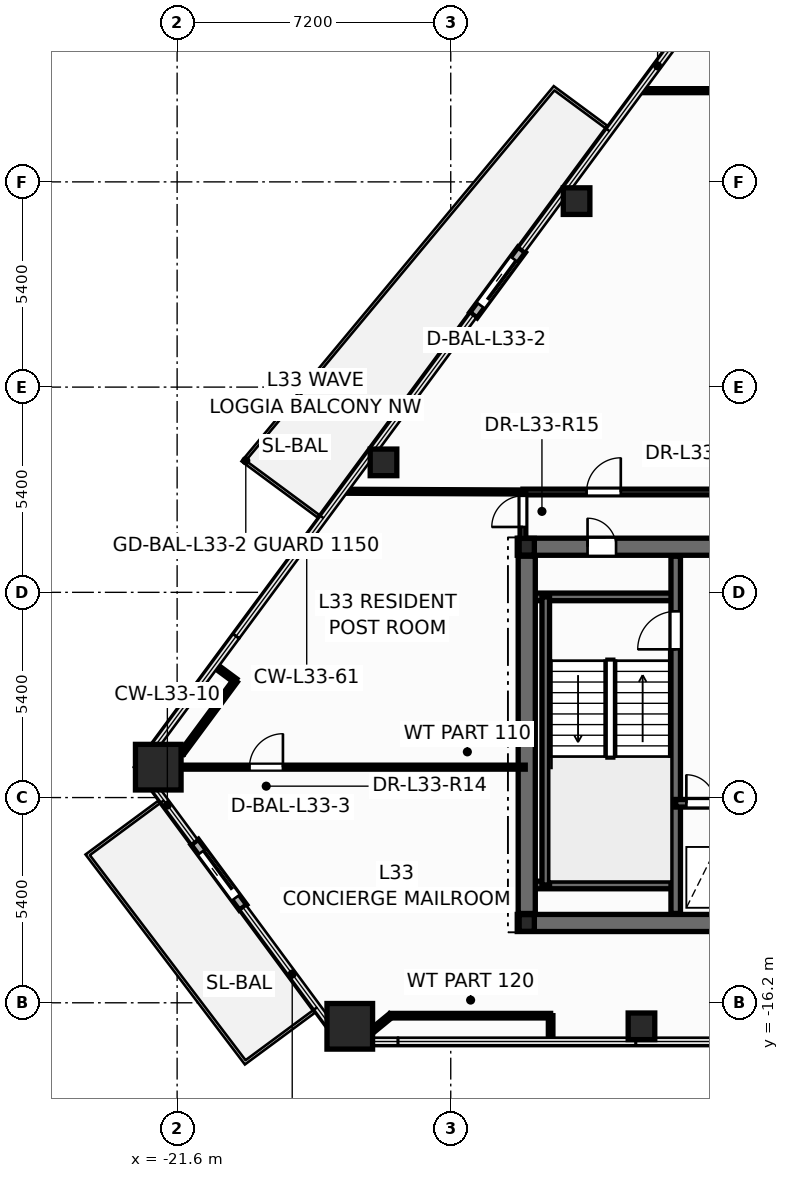
"""IFC4 building model, lengths in metres.
Left out: names, types, materials, properties, quantities, classifications, styles, units other than length and angle.
Written with IfcOpenShell. Run it as: python <this file> out.ifc"""

import sys

from ifc_helpers import new_model, si_unit, direction, frame, frame_2d, origin, origin_2d, place, context, subcontext, project, spatial, rectangle, hollow_rectangle, hollow_circle, i_section, extrude, element, fill, save


model = new_model("IFC4")
c1 = context("Model", 3, precision=1e-05, world=origin(), true_north=direction((0.0, 1.0)))
c2 = subcontext(c1, "Body", "Model", "MODEL_VIEW")
j1 = project(units=[si_unit("LENGTHUNIT", "METRE"), si_unit("PLANEANGLEUNIT", "RADIAN")], contexts=[c1])
p1 = place(None, origin())
s1 = spatial("IfcSite", under=j1, at=p1, CompositionType="ELEMENT")
p2 = place(p1, origin())
s2 = spatial("IfcBuilding", under=s1, at=p2, CompositionType="ELEMENT")
p3 = place(p2, frame((0.0, 0.0, 129.3)))
s3 = spatial("IfcBuildingStorey", under=s2, at=p3, CompositionType="ELEMENT", Elevation=129.3)
for number, where, z_axis, x_axis in (
    (1, (-22.096, -10.0, 0.0), (0.0, 0.0, 1.0), (1.0, 0.0, 0.0)),
    (2, (-17.057, -16.819, 0.0), (0.0, 0.0, 1.0), (1.0, 0.0, 0.0)),
):
    element("IfcColumn", number, at=place(p3, frame(where, z_axis=z_axis, x_axis=x_axis)), inside=s3, PredefinedType="COLUMN", context=c2, shape_type="SweptSolid", body=[
        extrude(hollow_rectangle(XDim=1.2, YDim=1.2, WallThickness=0.055, at=origin_2d()), origin(), (0.0, 0.0, 1.0), 3.6),
    ])
for number, where, z_axis, x_axis in (
    (3, (-9.381, -16.819, 0.0), (0.0, 0.0, 1.0), (1.0, 0.0, 0.0)),
    (4, (-11.089, 4.894, 0.0), (0.0, 0.0, 1.0), (1.0, 0.0, 0.0)),
    (5, (-16.169, -1.98, 0.0), (0.0, 0.0, 1.0), (1.0, 0.0, 0.0)),
):
    element("IfcColumn", number, at=place(p3, frame(where, z_axis=z_axis, x_axis=x_axis)), inside=s3, PredefinedType="COLUMN", context=c2, shape_type="SweptSolid", body=[
        extrude(hollow_circle(Radius=0.35, WallThickness=0.03, at=origin_2d()), origin(), (0.0, 0.0, 1.0), 3.6),
    ])
for number, where, z_axis, x_axis in (
    (6, (-12.4, -14.1, 0.0), (0.0, 0.0, 1.0), (1.0, 0.0, 0.0)),
    (7, (-12.4, -4.2, 0.0), (0.0, 0.0, 1.0), (1.0, 0.0, 0.0)),
):
    element("IfcColumn", number, at=place(p3, frame(where, z_axis=z_axis, x_axis=x_axis)), inside=s3, PredefinedType="COLUMN", context=c2, shape_type="SweptSolid", body=[
        extrude(i_section(OverallWidth=0.4, OverallDepth=0.44, WebThickness=0.028, FlangeThickness=0.04, at=origin_2d()), origin(), (0.0, 0.0, 1.0), 3.6),
    ])
p4 = place(p3, frame((-12.532, 3.614, -0.015), z_axis=(0.0, 0.0, 1.0), x_axis=(-0.594381437757, -0.804183254271, 0.0)))
e8 = element("IfcWall", 8, at=p4, inside=s3, PredefinedType="STANDARD", context=c2, shape_type="SweptSolid", body=[
    extrude(rectangle(XDim=2.14, YDim=0.24, at=frame_2d((1.07, 0.0))), origin(), (0.0, 0.0, 1.0), 2.807),
])
p5 = place(p4, frame((0.32, 0.0, 0.015)))
e9 = element("IfcOpeningElement", 9, at=p5, cuts=e8, PredefinedType="OPENING", context=c2, shape_type="SweptSolid", body=[
    extrude(rectangle(XDim=1.506, YDim=2.204, at=frame_2d((0.75, 1.102))), frame((0.0, 0.13, 0.0), z_axis=(0.0, -1.0, 0.0), x_axis=(1.0, 0.0, 0.0)), (0.0, 0.0, 1.0), 0.26),
])
p6 = place(p3, frame((-21.138, -11.97, -0.015), z_axis=(0.0, 0.0, 1.0), x_axis=(0.594381437757, -0.804183254271, 0.0)))
e10 = element("IfcWall", 10, at=p6, inside=s3, PredefinedType="STANDARD", context=c2, shape_type="SweptSolid", body=[
    extrude(rectangle(XDim=2.14, YDim=0.24, at=frame_2d((1.07, 0.0))), origin(), (0.0, 0.0, 1.0), 2.807),
])
p7 = place(p6, frame((0.32, 0.0, 0.015)))
e11 = element("IfcOpeningElement", 11, at=p7, cuts=e10, PredefinedType="OPENING", context=c2, shape_type="SweptSolid", body=[
    extrude(rectangle(XDim=1.506, YDim=2.204, at=frame_2d((0.75, 1.102))), frame((0.0, 0.13, 0.0), z_axis=(0.0, -1.0, 0.0), x_axis=(1.0, 0.0, 0.0)), (0.0, 0.0, 1.0), 0.26),
])
p8 = place(p3, frame((-12.65, -14.1, 0.0), z_axis=(0.0, 0.0, 1.0), x_axis=(1.0, 0.0, 0.0)))
e12 = element("IfcWall", 12, at=p8, inside=s3, PredefinedType="SHEAR", context=c2, shape_type="SweptSolid", body=[
    extrude(rectangle(XDim=25.3, YDim=0.45, at=frame_2d((12.65, 0.0))), origin(), (0.0, 0.0, 1.0), 3.6),
])
p9 = place(p3, frame((-12.65, -4.2, 0.0), z_axis=(0.0, 0.0, 1.0), x_axis=(1.0, 0.0, 0.0)))
e13 = element("IfcWall", 13, at=p9, inside=s3, PredefinedType="SHEAR", context=c2, shape_type="SweptSolid", body=[
    extrude(rectangle(XDim=25.3, YDim=0.45, at=frame_2d((12.65, 0.0))), origin(), (0.0, 0.0, 1.0), 3.6),
])
p10 = place(p9, frame((1.85, 0.0, 0.0)))
e14 = element("IfcOpeningElement", 14, at=p10, cuts=e13, PredefinedType="OPENING", context=c2, shape_type="SweptSolid", body=[
    extrude(rectangle(XDim=0.756, YDim=2.054, at=frame_2d((0.375, 1.027))), frame((0.0, 0.235, 0.0), z_axis=(0.0, -1.0, 0.0), x_axis=(1.0, 0.0, 0.0)), (0.0, 0.0, 1.0), 0.47),
])
p11 = place(p9, frame((22.65, 0.0, 0.0)))
e15 = element("IfcOpeningElement", 15, at=p11, cuts=e13, PredefinedType="OPENING", context=c2, shape_type="SweptSolid", body=[
    extrude(rectangle(XDim=0.756, YDim=2.054, at=frame_2d((0.375, 1.027))), frame((0.0, 0.235, 0.0), z_axis=(0.0, -1.0, 0.0), x_axis=(1.0, 0.0, 0.0)), (0.0, 0.0, 1.0), 0.47),
])
p12 = place(p9, frame((5.85, 0.0, 0.0)))
e16 = element("IfcOpeningElement", 16, at=p12, cuts=e13, PredefinedType="OPENING", context=c2, shape_type="SweptSolid", body=[
    extrude(rectangle(XDim=1.006, YDim=2.104, at=frame_2d((0.5, 1.052))), frame((0.0, 0.235, 0.0), z_axis=(0.0, -1.0, 0.0), x_axis=(1.0, 0.0, 0.0)), (0.0, 0.0, 1.0), 0.47),
])
p13 = place(p9, frame((10.35, 0.0, 0.0)))
e17 = element("IfcOpeningElement", 17, at=p13, cuts=e13, PredefinedType="OPENING", context=c2, shape_type="SweptSolid", body=[
    extrude(rectangle(XDim=1.406, YDim=2.154, at=frame_2d((0.7, 1.077))), frame((0.0, 0.235, 0.0), z_axis=(0.0, -1.0, 0.0), x_axis=(1.0, 0.0, 0.0)), (0.0, 0.0, 1.0), 0.47),
])
p14 = place(p9, frame((18.45, 0.0, 0.0)))
e18 = element("IfcOpeningElement", 18, at=p14, cuts=e13, PredefinedType="OPENING", context=c2, shape_type="SweptSolid", body=[
    extrude(rectangle(XDim=1.006, YDim=2.104, at=frame_2d((0.5, 1.052))), frame((0.0, 0.235, 0.0), z_axis=(0.0, -1.0, 0.0), x_axis=(1.0, 0.0, 0.0)), (0.0, 0.0, 1.0), 0.47),
])
for number, where, z_axis, x_axis in (
    (19, (-12.35, -5.52, 0.0), (0.0, 0.0, 1.0), (1.0, 0.0, 0.0)),
    (20, (-12.35, -13.1, 0.0), (0.0, 0.0, 1.0), (1.0, 0.0, 0.0)),
):
    element("IfcWall", number, at=place(p3, frame(where, z_axis=z_axis, x_axis=x_axis)), inside=s3, PredefinedType="SOLIDWALL", context=c2, shape_type="SweptSolid", body=[
        extrude(rectangle(XDim=3.87, YDim=0.2, at=frame_2d((1.935, 0.0))), origin(), (0.0, 0.0, 1.0), 3.6),
    ])
p15 = place(p3, frame((-11.9, -13.1, 0.0), z_axis=(0.0, 0.0, 1.0), x_axis=(0.0, 1.0, 0.0)))
e21 = element("IfcWall", 21, at=p15, inside=s3, PredefinedType="SOLIDWALL", context=c2, shape_type="SweptSolid", body=[
    extrude(rectangle(XDim=7.58, YDim=0.2, at=frame_2d((3.79, 0.0))), origin(), (0.0, 0.0, 1.0), 3.6),
])
p16 = place(p3, frame((-8.48, -13.85, 0.0), z_axis=(0.0, 0.0, 1.0), x_axis=(0.0, 1.0, 0.0)))
e22 = element("IfcWall", 22, at=p16, inside=s3, PredefinedType="SHEAR", context=c2, shape_type="SweptSolid", body=[
    extrude(rectangle(XDim=9.4, YDim=0.25, at=frame_2d((4.7, 0.0))), origin(), (0.0, 0.0, 1.0), 3.6),
])
p17 = place(p16, frame((6.95, 0.0, 0.0)))
e23 = element("IfcOpeningElement", 23, at=p17, cuts=e22, PredefinedType="OPENING", context=c2, shape_type="SweptSolid", body=[
    extrude(rectangle(XDim=1.006, YDim=2.104, at=frame_2d((0.5, 1.052))), frame((0.0, 0.135, 0.0), z_axis=(0.0, -1.0, 0.0), x_axis=(1.0, 0.0, 0.0)), (0.0, 0.0, 1.0), 0.27),
])
p18 = place(p3, frame((-8.48, -10.95, 0.0), z_axis=(0.0, 0.0, 1.0), x_axis=(1.0, 0.0, 0.0)))
e24 = element("IfcWall", 24, at=p18, inside=s3, PredefinedType="SOLIDWALL", context=c2, shape_type="SweptSolid", body=[
    extrude(rectangle(XDim=3.36, YDim=0.2, at=frame_2d((1.68, 0.0))), origin(), (0.0, 0.0, 1.0), 3.6),
])
p19 = place(p18, frame((0.28, 0.0, 0.0)))
e25 = element("IfcOpeningElement", 25, at=p19, cuts=e24, PredefinedType="OPENING", context=c2, shape_type="SweptSolid", body=[
    extrude(rectangle(XDim=0.756, YDim=2.054, at=frame_2d((0.375, 1.027))), frame((0.0, 0.11, 0.0), z_axis=(0.0, -1.0, 0.0), x_axis=(1.0, 0.0, 0.0)), (0.0, 0.0, 1.0), 0.22),
])
p20 = place(p18, frame((1.85, 0.0, 0.0)))
e26 = element("IfcOpeningElement", 26, at=p20, cuts=e24, PredefinedType="OPENING", context=c2, shape_type="SweptSolid", body=[
    extrude(rectangle(XDim=1.106, YDim=2.104, at=frame_2d((0.55, 1.052))), frame((0.0, 0.11, 0.0), z_axis=(0.0, -1.0, 0.0), x_axis=(1.0, 0.0, 0.0)), (0.0, 0.0, 1.0), 0.22),
])
p21 = place(p3, frame((-12.4, -13.85, 0.0), z_axis=(0.0, 0.0, 1.0), x_axis=(0.0, 1.0, 0.0)))
e27 = element("IfcWall", 27, at=p21, inside=s3, PredefinedType="SHEAR", context=c2, shape_type="SweptSolid", body=[
    extrude(rectangle(XDim=9.4, YDim=0.45, at=frame_2d((4.7, 0.0))), origin(), (0.0, 0.0, 1.0), 3.6),
])
p22 = place(p3, frame((-12.5, -2.76, 0.0), z_axis=(0.0, 0.0, 1.0), x_axis=(1.0, 0.0, 0.0)))
e28 = element("IfcWall", 28, at=p22, inside=s3, PredefinedType="PARTITIONING", context=c2, shape_type="SweptSolid", body=[
    extrude(rectangle(XDim=13.14, YDim=0.15, at=frame_2d((6.57, 0.0))), origin(), (0.0, 0.0, 1.0), 2.325),
])
p23 = place(p22, frame((1.675, 0.0, 0.0)))
e29 = element("IfcOpeningElement", 29, at=p23, cuts=e28, PredefinedType="OPENING", context=c2, shape_type="SweptSolid", body=[
    extrude(rectangle(XDim=0.906, YDim=2.104, at=frame_2d((0.45, 1.052))), frame((0.0, 0.085, 0.0), z_axis=(0.0, -1.0, 0.0), x_axis=(1.0, 0.0, 0.0)), (0.0, 0.0, 1.0), 0.17),
])
p24 = place(p3, frame((-22.594, -10.0, 0.0), z_axis=(0.0, 0.0, 1.0), x_axis=(1.0, 0.0, 0.0)))
e30 = element("IfcWall", 30, at=p24, inside=s3, PredefinedType="PARTITIONING", context=c2, shape_type="SweptSolid", body=[
    extrude(rectangle(XDim=10.154, YDim=0.105, at=frame_2d((5.077, 0.0))), origin(), (0.0, 0.0, 1.0), 2.325),
])
p25 = place(p24, frame((2.898, 0.0, 0.0)))
e31 = element("IfcOpeningElement", 31, at=p25, cuts=e30, PredefinedType="OPENING", context=c2, shape_type="SweptSolid", body=[
    extrude(rectangle(XDim=0.886, YDim=2.104, at=frame_2d((0.44, 1.052))), frame((0.0, 0.062, 0.0), z_axis=(0.0, -1.0, 0.0), x_axis=(1.0, 0.0, 0.0)), (0.0, 0.0, 1.0), 0.125),
])
p26 = place(p3, frame((-9.438, 7.8, 0.0), z_axis=(0.0, 0.0, 1.0), x_axis=(1.0, 0.0, 0.0)))
e32 = element("IfcWall", 32, at=p26, inside=s3, PredefinedType="PARTITIONING", context=c2, shape_type="SweptSolid", body=[
    extrude(rectangle(XDim=10.078, YDim=0.105, at=frame_2d((5.039, 0.0))), origin(), (0.0, 0.0, 1.0), 2.325),
])
p27 = place(p3, frame((-17.228, -2.74, 0.0), z_axis=(0.0, 0.0, 1.0), x_axis=(0.999991471145, -0.004130089188, 0.0)))
e33 = element("IfcWall", 33, at=p27, inside=s3, PredefinedType="PARTITIONING", context=c2, shape_type="SweptSolid", body=[
    extrude(rectangle(XDim=4.788, YDim=0.105, at=frame_2d((2.394, 0.0))), origin(), (0.0, 0.0, 1.0), 2.792),
])
p28 = place(p3, frame((-15.982, -16.539, 0.0), z_axis=(0.0, 0.0, 1.0), x_axis=(1.0, 0.0, 0.0)))
e34 = element("IfcWall", 34, at=p28, inside=s3, PredefinedType="PARTITIONING", context=c2, shape_type="SweptSolid", body=[
    extrude(rectangle(XDim=4.211, YDim=0.12, at=frame_2d((2.105, 0.0))), origin(), (0.0, 0.0, 1.0), 3.35),
])
p29 = place(p3, frame((-20.066, -7.725, 0.0), z_axis=(0.0, 0.0, 1.0), x_axis=(-0.594385220585, -0.804180458324, 0.0)))
e35 = element("IfcWall", 35, at=p29, inside=s3, PredefinedType="PARTITIONING", context=c2, shape_type="SweptSolid", body=[
    extrude(rectangle(XDim=2.351, YDim=0.12, at=frame_2d((1.175, 0.0))), origin(), (0.0, 0.0, 1.0), 2.325),
])
p30 = place(p3, frame((-12.5, -4.24, 0.0), z_axis=(0.0, 0.0, 1.0), x_axis=(0.0, 1.0, 0.0)))
e36 = element("IfcWall", 36, at=p30, inside=s3, PredefinedType="PARTITIONING", context=c2, shape_type="SweptSolid", body=[
    extrude(rectangle(XDim=1.48, YDim=0.15, at=frame_2d((0.74, 0.0))), origin(), (0.0, 0.0, 1.0), 2.325),
])
p31 = place(p30, frame((0.56, 0.0, 0.0)))
e37 = element("IfcOpeningElement", 37, at=p31, cuts=e36, PredefinedType="OPENING", context=c2, shape_type="SweptSolid", body=[
    extrude(rectangle(XDim=0.826, YDim=2.104, at=frame_2d((0.41, 1.052))), frame((0.0, 0.085, 0.0), z_axis=(0.0, -1.0, 0.0), x_axis=(1.0, 0.0, 0.0)), (0.0, 0.0, 1.0), 0.17),
])
p32 = place(p3, frame((-16.641, -17.08, 0.0), z_axis=(0.0, 0.0, 1.0), x_axis=(0.77301214671, 0.634391220809, 0.0)))
e38 = element("IfcWall", 38, at=p32, inside=s3, PredefinedType="PARTITIONING", context=c2, shape_type="SweptSolid", body=[
    extrude(rectangle(XDim=0.853, YDim=0.12, at=frame_2d((0.426, 0.0))), origin(), (0.0, 0.0, 1.0), 2.792),
])
p33 = place(p3, frame((-21.464, -9.615, 0.0), z_axis=(0.0, 0.0, 1.0), x_axis=(-0.982663626831, -0.185397401557, 0.0)))
e39 = element("IfcWall", 39, at=p33, inside=s3, PredefinedType="PARTITIONING", context=c2, shape_type="SweptSolid", body=[
    extrude(rectangle(XDim=0.851, YDim=0.12, at=frame_2d((0.425, 0.0))), origin(), (0.0, 0.0, 1.0), 2.325),
])
for number, where, z_axis, x_axis in (
    (40, (-20.605, -7.326, 0.0), (0.0, 0.0, 1.0), (0.804, -0.595, 0.0)),
    (41, (-11.771, -16.539, 0.0), (0.0, 0.0, 1.0), (0.0, -1.0, 0.0)),
):
    element("IfcWall", number, at=place(p3, frame(where, z_axis=z_axis, x_axis=x_axis)), inside=s3, PredefinedType="PARTITIONING", context=c2, shape_type="SweptSolid", body=[
        extrude(rectangle(XDim=0.67, YDim=0.12, at=frame_2d((0.335, 0.0))), origin(), (0.0, 0.0, 1.0), 2.792),
    ])
p34 = place(p5, origin())
e42 = element("IfcDoor", 42, at=p34, inside=s3, OperationType="SLIDING_TO_RIGHT", PredefinedType="DOOR", context=c2, shape_type="SweptSolid", body=[
    extrude(rectangle(XDim=1.5, YDim=2.2, at=frame_2d((0.75, 1.1))), frame((0.0, 0.025, 0.0), z_axis=(0.0, -1.0, 0.0), x_axis=(1.0, 0.0, 0.0)), (0.0, 0.0, 1.0), 0.05),
])
fill(e9, e42)
p35 = place(p7, origin())
e43 = element("IfcDoor", 43, at=p35, inside=s3, OperationType="SLIDING_TO_RIGHT", PredefinedType="DOOR", context=c2, shape_type="SweptSolid", body=[
    extrude(rectangle(XDim=1.5, YDim=2.2, at=frame_2d((0.75, 1.1))), frame((0.0, 0.025, 0.0), z_axis=(0.0, -1.0, 0.0), x_axis=(1.0, 0.0, 0.0)), (0.0, 0.0, 1.0), 0.05),
])
fill(e11, e43)
p36 = place(p17, origin())
e44 = element("IfcDoor", 44, at=p36, inside=s3, OperationType="SINGLE_SWING_LEFT", PredefinedType="DOOR", context=c2, shape_type="SweptSolid", body=[
    extrude(rectangle(XDim=1.0, YDim=2.1, at=frame_2d((0.5, 1.05))), frame((0.0, 0.025, 0.0), z_axis=(0.0, -1.0, 0.0), x_axis=(1.0, 0.0, 0.0)), (0.0, 0.0, 1.0), 0.05),
])
fill(e23, e44)
p37 = place(p19, origin())
e45 = element("IfcDoor", 45, at=p37, inside=s3, OperationType="SINGLE_SWING_LEFT", PredefinedType="DOOR", context=c2, shape_type="SweptSolid", body=[
    extrude(rectangle(XDim=0.75, YDim=2.05, at=frame_2d((0.375, 1.025))), frame((0.0, 0.025, 0.0), z_axis=(0.0, -1.0, 0.0), x_axis=(1.0, 0.0, 0.0)), (0.0, 0.0, 1.0), 0.05),
])
fill(e25, e45)
p38 = place(p10, origin())
e46 = element("IfcDoor", 46, at=p38, inside=s3, OperationType="SINGLE_SWING_LEFT", PredefinedType="DOOR", context=c2, shape_type="SweptSolid", body=[
    extrude(rectangle(XDim=0.75, YDim=2.05, at=frame_2d((0.375, 1.025))), frame((0.0, 0.025, 0.0), z_axis=(0.0, -1.0, 0.0), x_axis=(1.0, 0.0, 0.0)), (0.0, 0.0, 1.0), 0.05),
])
fill(e14, e46)
p39 = place(p23, origin())
e47 = element("IfcDoor", 47, at=p39, inside=s3, OperationType="SINGLE_SWING_RIGHT", PredefinedType="DOOR", context=c2, shape_type="SweptSolid", body=[
    extrude(rectangle(XDim=0.9, YDim=2.1, at=frame_2d((0.45, 1.05))), frame((0.0, 0.025, 0.0), z_axis=(0.0, -1.0, 0.0), x_axis=(1.0, 0.0, 0.0)), (0.0, 0.0, 1.0), 0.05),
])
fill(e29, e47)
p40 = place(p25, origin())
e48 = element("IfcDoor", 48, at=p40, inside=s3, OperationType="SINGLE_SWING_RIGHT", PredefinedType="DOOR", context=c2, shape_type="SweptSolid", body=[
    extrude(rectangle(XDim=0.88, YDim=2.1, at=frame_2d((0.44, 1.05))), frame((0.0, 0.025, 0.0), z_axis=(0.0, -1.0, 0.0), x_axis=(1.0, 0.0, 0.0)), (0.0, 0.0, 1.0), 0.05),
])
fill(e31, e48)
p41 = place(p31, origin())
e49 = element("IfcDoor", 49, at=p41, inside=s3, OperationType="SINGLE_SWING_LEFT", PredefinedType="DOOR", context=c2, shape_type="SweptSolid", body=[
    extrude(rectangle(XDim=0.82, YDim=2.1, at=frame_2d((0.41, 1.05))), frame((0.0, 0.025, 0.0), z_axis=(0.0, -1.0, 0.0), x_axis=(1.0, 0.0, 0.0)), (0.0, 0.0, 1.0), 0.05),
])
fill(e37, e49)
save(model, sys.argv[1])
